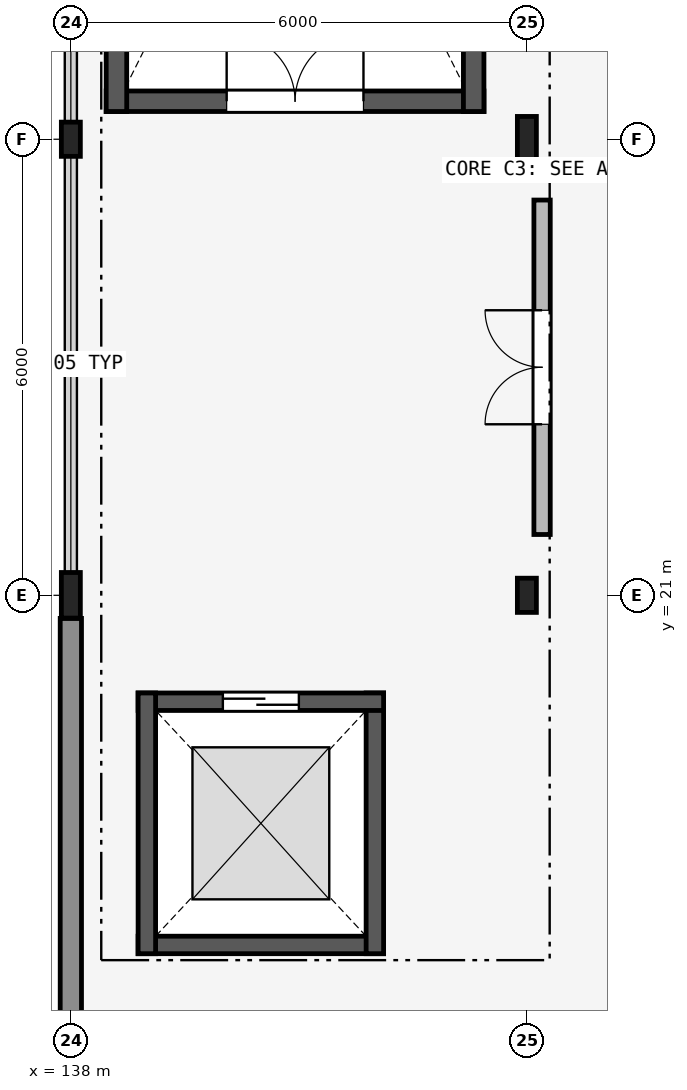
"""IFC4 building model, lengths in metres.
Left out: names, types, materials, properties, quantities, classifications, styles, units other than length and angle.
Written with IfcOpenShell. Run it as: python <this file> out.ifc"""

import sys

from ifc_helpers import new_model, si_unit, direction, frame, frame_2d, origin, origin_2d, place, context, subcontext, project, spatial, rectangle, i_section, extrude, element, fill, save


model = new_model("IFC4")
c1 = context("Model", 3, precision=1e-05, world=origin(), true_north=direction((0.0, 1.0)))
c2 = subcontext(c1, "Body", "Model", "MODEL_VIEW")
j1 = project(units=[si_unit("LENGTHUNIT", "METRE"), si_unit("PLANEANGLEUNIT", "RADIAN")], contexts=[c1])
p1 = place(None, origin())
s1 = spatial("IfcSite", under=j1, at=p1, CompositionType="ELEMENT")
p2 = place(p1, origin())
s2 = spatial("IfcBuilding", under=s1, at=p2, CompositionType="ELEMENT")
p3 = place(p2, frame((0.0, 0.0, 4.8)))
s3 = spatial("IfcBuildingStorey", under=s2, at=p3, CompositionType="ELEMENT", Elevation=4.8)
p4 = place(p3, frame((138.0, 21.0, 0.0), z_axis=(0.0, 0.0, 1.0), x_axis=(1.0, 0.0, 0.0)))
e1 = element("IfcColumn", 1, at=p4, inside=s3, PredefinedType="COLUMN", context=c2, shape_type="SweptSolid", body=[
    extrude(i_section(OverallWidth=0.25, OverallDepth=0.6, WebThickness=0.012, FlangeThickness=0.024, FilletRadius=0.017, at=origin_2d()), origin(), (0.0, 0.0, 1.0), 4.5),
])
for number, where, z_axis, x_axis in (
    (2, (138.0, 27.0, 0.0), (0.0, 0.0, 1.0), (1.0, 0.0, 0.0)),
    (3, (144.0, 21.0, 0.0), (0.0, 0.0, 1.0), (1.0, 0.0, 0.0)),
):
    element("IfcColumn", number, at=place(p3, frame(where, z_axis=z_axis, x_axis=x_axis)), inside=s3, PredefinedType="COLUMN", context=c2, shape_type="SweptSolid", body=[
        extrude(i_section(OverallWidth=0.25, OverallDepth=0.45, WebThickness=0.011, FlangeThickness=0.014, FilletRadius=0.015, at=origin_2d()), origin(), (0.0, 0.0, 1.0), 4.5),
    ])
p5 = place(p3, frame((144.0, 27.0, 0.0), z_axis=(0.0, 0.0, 1.0), x_axis=(1.0, 0.0, 0.0)))
e4 = element("IfcColumn", 4, at=p5, inside=s3, PredefinedType="COLUMN", context=c2, shape_type="SweptSolid", body=[
    extrude(i_section(OverallWidth=0.25, OverallDepth=0.6, WebThickness=0.012, FlangeThickness=0.024, FilletRadius=0.017, at=origin_2d()), origin(), (0.0, 0.0, 1.0), 4.5),
])
p6 = place(p3, frame((138.0, 15.304, 0.0), z_axis=(0.0, 0.0, 1.0), x_axis=(0.0, 1.0, 0.0)))
e5 = element("IfcWall", 5, at=p6, inside=s3, PredefinedType="SOLIDWALL", context=c2, shape_type="SweptSolid", body=[
    extrude(rectangle(XDim=5.392, YDim=0.28, at=frame_2d((2.696, 0.0))), origin(), (0.0, 0.0, 1.0), 3.59),
])
p7 = place(p3, frame((138.465, 27.5, 0.0), z_axis=(0.0, 0.0, 1.0), x_axis=(1.0, 0.0, 0.0)))
e6 = element("IfcWall", 6, at=p7, inside=s3, PredefinedType="SHEAR", context=c2, shape_type="SweptSolid", body=[
    extrude(rectangle(XDim=4.97, YDim=0.27, at=frame_2d((2.485, 0.0))), origin(), (0.0, 0.0, 1.0), 4.36),
])
p8 = place(p7, frame((1.585, 0.0, 0.0)))
e7 = element("IfcOpeningElement", 7, at=p8, cuts=e6, PredefinedType="OPENING", context=c2, shape_type="SweptSolid", body=[
    extrude(rectangle(XDim=1.8, YDim=2.2, at=frame_2d((0.9, 1.1))), frame((0.0, 0.145, 0.0), z_axis=(0.0, -1.0, 0.0), x_axis=(1.0, 0.0, 0.0)), (0.0, 0.0, 1.0), 0.29),
])
for number, where, z_axis, x_axis in (
    (8, (143.3, 27.365, 0.0), (0.0, 0.0, 1.0), (0.0, 1.0, 0.0)),
    (9, (138.6, 36.935, 0.0), (0.0, 0.0, 1.0), (0.0, -1.0, 0.0)),
):
    element("IfcWall", number, at=place(p3, frame(where, z_axis=z_axis, x_axis=x_axis)), inside=s3, PredefinedType="SHEAR", context=c2, shape_type="SweptSolid", body=[
        extrude(rectangle(XDim=9.57, YDim=0.27, at=frame_2d((4.785, 0.0))), origin(), (0.0, 0.0, 1.0), 4.36),
    ])
p9 = place(p3, frame((144.2, 21.8, 0.0), z_axis=(0.0, 0.0, 1.0), x_axis=(0.0, 1.0, 0.0)))
e10 = element("IfcWall", 10, at=p9, inside=s3, PredefinedType="PARTITIONING", context=c2, shape_type="SweptSolid", body=[
    extrude(rectangle(XDim=4.4, YDim=0.215, at=frame_2d((2.2, 0.0))), origin(), (0.0, 0.0, 1.0), 3.69),
])
p10 = place(p9, frame((1.45, 0.0, 0.0)))
e11 = element("IfcOpeningElement", 11, at=p10, cuts=e10, PredefinedType="OPENING", context=c2, shape_type="SweptSolid", body=[
    extrude(rectangle(XDim=1.5, YDim=2.15, at=frame_2d((0.75, 1.075))), frame((0.0, 0.117, 0.0), z_axis=(0.0, -1.0, 0.0), x_axis=(1.0, 0.0, 0.0)), (0.0, 0.0, 1.0), 0.235),
])
p11 = place(p3, frame((138.885, 16.4, 0.0), z_axis=(0.0, 0.0, 1.0), x_axis=(1.0, 0.0, 0.0)))
e12 = element("IfcWall", 12, at=p11, inside=s3, PredefinedType="SHEAR", context=c2, shape_type="SweptSolid", body=[
    extrude(rectangle(XDim=3.23, YDim=0.23, at=frame_2d((1.615, 0.0))), origin(), (0.0, 0.0, 1.0), 4.5),
])
p12 = place(p3, frame((142.0, 16.285, 0.0), z_axis=(0.0, 0.0, 1.0), x_axis=(0.0, 1.0, 0.0)))
e13 = element("IfcWall", 13, at=p12, inside=s3, PredefinedType="SHEAR", context=c2, shape_type="SweptSolid", body=[
    extrude(rectangle(XDim=3.43, YDim=0.23, at=frame_2d((1.715, 0.0))), origin(), (0.0, 0.0, 1.0), 4.5),
])
p13 = place(p3, frame((142.115, 19.6, 0.0), z_axis=(0.0, 0.0, 1.0), x_axis=(-1.0, 0.0, 0.0)))
e14 = element("IfcWall", 14, at=p13, inside=s3, PredefinedType="SHEAR", context=c2, shape_type="SweptSolid", body=[
    extrude(rectangle(XDim=3.23, YDim=0.23, at=frame_2d((1.615, 0.0))), origin(), (0.0, 0.0, 1.0), 4.5),
])
p14 = place(p13, frame((1.115, 0.0, 0.0)))
e15 = element("IfcOpeningElement", 15, at=p14, cuts=e14, PredefinedType="OPENING", context=c2, shape_type="SweptSolid", body=[
    extrude(rectangle(XDim=1.0, YDim=2.15, at=frame_2d((0.5, 1.075))), frame((0.0, 0.125, 0.0), z_axis=(0.0, -1.0, 0.0), x_axis=(1.0, 0.0, 0.0)), (0.0, 0.0, 1.0), 0.25),
])
p15 = place(p3, frame((139.0, 19.715, 0.0), z_axis=(0.0, 0.0, 1.0), x_axis=(0.0, -1.0, 0.0)))
e16 = element("IfcWall", 16, at=p15, inside=s3, PredefinedType="SHEAR", context=c2, shape_type="SweptSolid", body=[
    extrude(rectangle(XDim=3.43, YDim=0.23, at=frame_2d((1.715, 0.0))), origin(), (0.0, 0.0, 1.0), 4.5),
])
p16 = place(p8, origin())
e17 = element("IfcDoor", 17, at=p16, inside=s3, OperationType="DOUBLE_DOOR_SINGLE_SWING", PredefinedType="DOOR", context=c2, shape_type="SweptSolid", body=[
    extrude(rectangle(XDim=1.8, YDim=2.2, at=frame_2d((0.9, 1.1))), frame((0.0, 0.025, 0.0), z_axis=(0.0, -1.0, 0.0), x_axis=(1.0, 0.0, 0.0)), (0.0, 0.0, 1.0), 0.05),
])
fill(e7, e17)
p17 = place(p10, origin())
e18 = element("IfcDoor", 18, at=p17, inside=s3, OperationType="DOUBLE_DOOR_SINGLE_SWING", PredefinedType="DOOR", context=c2, shape_type="SweptSolid", body=[
    extrude(rectangle(XDim=1.5, YDim=2.15, at=frame_2d((0.75, 1.075))), frame((0.0, 0.025, 0.0), z_axis=(0.0, -1.0, 0.0), x_axis=(1.0, 0.0, 0.0)), (0.0, 0.0, 1.0), 0.05),
])
fill(e11, e18)
p18 = place(p14, origin())
e19 = element("IfcDoor", 19, at=p18, inside=s3, OperationType="SLIDING_TO_LEFT", PredefinedType="DOOR", context=c2, shape_type="SweptSolid", body=[
    extrude(rectangle(XDim=1.0, YDim=2.15, at=frame_2d((0.5, 1.075))), frame((0.0, 0.025, 0.0), z_axis=(0.0, -1.0, 0.0), x_axis=(1.0, 0.0, 0.0)), (0.0, 0.0, 1.0), 0.05),
])
fill(e15, e19)
save(model, sys.argv[1])
